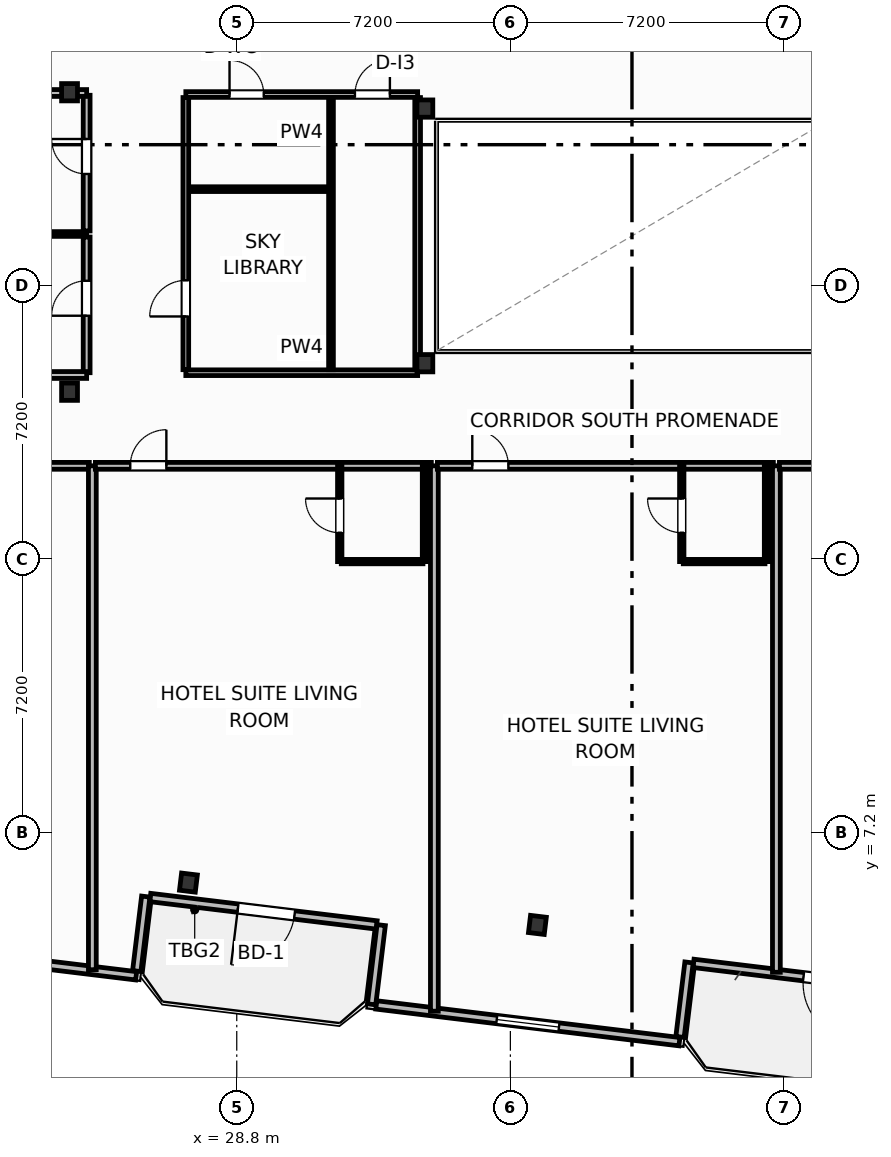
"""IFC4 building model, lengths in metres.
Left out: names, types, materials, properties, quantities, classifications, styles, units other than length and angle.
Written with IfcOpenShell. Run it as: python <this file> out.ifc"""

import sys

from ifc_helpers import new_model, si_unit, direction, frame, frame_2d, origin, origin_2d, place, context, subcontext, project, spatial, rectangle, i_section, extrude, element, fill, save


model = new_model("IFC4")
c1 = context("Model", 3, precision=1e-05, world=origin(), true_north=direction((0.0, 1.0)))
c2 = subcontext(c1, "Body", "Model", "MODEL_VIEW")
j1 = project(units=[si_unit("LENGTHUNIT", "METRE"), si_unit("PLANEANGLEUNIT", "RADIAN")], contexts=[c1])
p1 = place(None, origin())
s1 = spatial("IfcSite", under=j1, at=p1, CompositionType="ELEMENT")
p2 = place(p1, origin())
s2 = spatial("IfcBuilding", under=s1, at=p2, CompositionType="ELEMENT")
p3 = place(p2, frame((0.0, 0.0, 147.6)))
s3 = spatial("IfcBuildingStorey", under=s2, at=p3, CompositionType="ELEMENT", Elevation=147.6)
for number, where, z_axis, x_axis in (
    (1, (33.75, 19.55, 0.0), (0.0, 0.0, 1.0), (1.0, 0.0, 0.0)),
    (2, (33.75, 26.25, 0.0), (0.0, 0.0, 1.0), (1.0, 0.0, 0.0)),
    (3, (24.4, 18.8, 0.0), (0.0, 0.0, 1.0), (1.0, 0.0, 0.0)),
    (4, (24.4, 26.68, 0.0), (0.0, 0.0, 1.0), (1.0, 0.0, 0.0)),
    (5, (27.529, 5.884, 0.0), (0.0, 0.0, 1.0), (0.993, -0.12, 0.0)),
    (6, (36.711, 4.77, 0.0), (0.0, 0.0, 1.0), (0.993, -0.12, 0.0)),
):
    element("IfcColumn", number, at=place(p3, frame(where, z_axis=z_axis, x_axis=x_axis)), inside=s3, PredefinedType="COLUMN", context=c2, shape_type="SweptSolid", body=[
        extrude(i_section(OverallWidth=0.418, OverallDepth=0.455, WebThickness=0.042, FlangeThickness=0.068, FilletRadius=0.025, at=origin_2d()), origin(), (0.0, 0.0, 1.0), 3.7),
    ])
p4 = place(p3, frame((32.48, 4.77, 0.0), z_axis=(0.0, 0.0, 1.0), x_axis=(-0.992735402148, 0.120318000826, 0.0)))
e7 = element("IfcWall", 7, at=p4, inside=s3, PredefinedType="SOLIDWALL", context=c2, shape_type="SweptSolid", body=[
    extrude(rectangle(XDim=6.0, YDim=0.22, at=frame_2d((3.0, 0.0))), origin(), (0.0, 0.0, 1.0), 2.73),
])
p5 = place(p4, frame((2.176, 0.0, 0.0)))
e8 = element("IfcOpeningElement", 8, at=p5, cuts=e7, PredefinedType="OPENING", context=c2, shape_type="SweptSolid", body=[
    extrude(rectangle(XDim=1.5, YDim=2.25, at=frame_2d((0.75, 1.125))), frame((0.0, 0.12, 0.0), z_axis=(0.0, -1.0, 0.0), x_axis=(1.0, 0.0, 0.0)), (0.0, 0.0, 1.0), 0.24),
])
p6 = place(p3, frame((46.776, 3.037, 0.0), z_axis=(0.0, 0.0, 1.0), x_axis=(-0.992735402148, 0.120318000826, 0.0)))
e9 = element("IfcWall", 9, at=p6, inside=s3, PredefinedType="SOLIDWALL", context=c2, shape_type="SweptSolid", body=[
    extrude(rectangle(XDim=6.0, YDim=0.22, at=frame_2d((3.0, 0.0))), origin(), (0.0, 0.0, 1.0), 2.73),
])
p7 = place(p6, frame((1.584, 0.0, 0.0)))
e10 = element("IfcOpeningElement", 10, at=p7, cuts=e9, PredefinedType="OPENING", context=c2, shape_type="SweptSolid", body=[
    extrude(rectangle(XDim=1.5, YDim=2.25, at=frame_2d((0.75, 1.125))), frame((0.0, 0.12, 0.0), z_axis=(0.0, -1.0, 0.0), x_axis=(1.0, 0.0, 0.0)), (0.0, 0.0, 1.0), 0.24),
])
p8 = place(p3, frame((4.862, 6.012, 0.0), z_axis=(0.0, 0.0, 1.0), x_axis=(0.99273213367, -0.120344965739, 0.0)))
e11 = element("IfcWall", 11, at=p8, inside=s3, PredefinedType="SOLIDWALL", context=c2, shape_type="SweptSolid", body=[
    extrude(rectangle(XDim=21.447, YDim=0.22, at=frame_2d((10.724, 0.0))), origin(), (0.0, 0.0, 1.0), 2.73),
])
p9 = place(p8, frame((5.543, 0.0, 0.8)))
e12 = element("IfcOpeningElement", 12, at=p9, cuts=e11, PredefinedType="OPENING", context=c2, shape_type="SweptSolid", body=[
    extrude(rectangle(XDim=1.65, YDim=1.65, at=frame_2d((0.825, 0.825))), frame((0.0, 0.12, 0.0), z_axis=(0.0, -1.0, 0.0), x_axis=(1.0, 0.0, 0.0)), (0.0, 0.0, 1.0), 0.24),
])
p10 = place(p3, frame((26.168, 3.555, 0.0), z_axis=(0.0, 0.0, 1.0), x_axis=(0.120290754542, 0.992738703976, 0.0)))
e13 = element("IfcWall", 13, at=p10, inside=s3, PredefinedType="SOLIDWALL", context=c2, shape_type="SweptSolid", body=[
    extrude(rectangle(XDim=1.975, YDim=0.22, at=frame_2d((0.987, 0.0))), origin(), (0.0, 0.0, 1.0), 2.73),
])
p11 = place(p3, frame((32.601, 4.765, 0.0), z_axis=(0.0, 0.0, 1.0), x_axis=(-0.120327895535, -0.992734202874, 0.0)))
e14 = element("IfcWall", 14, at=p11, inside=s3, PredefinedType="SOLIDWALL", context=c2, shape_type="SweptSolid", body=[
    extrude(rectangle(XDim=2.1, YDim=0.22, at=frame_2d((1.05, 0.0))), origin(), (0.0, 0.0, 1.0), 2.73),
])
p12 = place(p3, frame((32.472, 2.665, 0.0), z_axis=(0.0, 0.0, 1.0), x_axis=(0.992734661931, -0.120324108143, 0.0)))
e15 = element("IfcWall", 15, at=p12, inside=s3, PredefinedType="SOLIDWALL", context=c2, shape_type="SweptSolid", body=[
    extrude(rectangle(XDim=8.035, YDim=0.22, at=frame_2d((4.018, 0.0))), origin(), (0.0, 0.0, 1.0), 2.73),
])
p13 = place(p12, frame((3.192, 0.0, 0.8)))
e16 = element("IfcOpeningElement", 16, at=p13, cuts=e15, PredefinedType="OPENING", context=c2, shape_type="SweptSolid", body=[
    extrude(rectangle(XDim=1.65, YDim=1.65, at=frame_2d((0.825, 0.825))), frame((0.0, 0.12, 0.0), z_axis=(0.0, -1.0, 0.0), x_axis=(1.0, 0.0, 0.0)), (0.0, 0.0, 1.0), 0.24),
])
p14 = place(p3, frame((40.464, 1.822, 0.0), z_axis=(0.0, 0.0, 1.0), x_axis=(0.120275992932, 0.992740492538, 0.0)))
e17 = element("IfcWall", 17, at=p14, inside=s3, PredefinedType="SOLIDWALL", context=c2, shape_type="SweptSolid", body=[
    extrude(rectangle(XDim=1.975, YDim=0.22, at=frame_2d((0.988, 0.0))), origin(), (0.0, 0.0, 1.0), 2.73),
])
p15 = place(p3, frame((16.08, 16.85, 0.0), z_axis=(0.0, 0.0, 1.0), x_axis=(1.0, 0.0, 0.0)))
e18 = element("IfcWall", 18, at=p15, inside=s3, PredefinedType="PARTITIONING", context=c2, shape_type="SweptSolid", body=[
    extrude(rectangle(XDim=8.84, YDim=0.18, at=frame_2d((4.42, 0.0))), origin(), (0.0, 0.0, 1.0), 3.45),
])
p16 = place(p15, frame((3.308, 0.0, 0.0)))
e19 = element("IfcOpeningElement", 19, at=p16, cuts=e18, PredefinedType="OPENING", context=c2, shape_type="SweptSolid", body=[
    extrude(rectangle(XDim=0.95, YDim=2.15, at=frame_2d((0.475, 1.075))), frame((0.0, 0.1, 0.0), z_axis=(0.0, -1.0, 0.0), x_axis=(1.0, 0.0, 0.0)), (0.0, 0.0, 1.0), 0.2),
])
p17 = place(p3, frame((25.0, 3.591, 0.0), z_axis=(0.0, 0.0, 1.0), x_axis=(0.0, 1.0, 0.0)))
e20 = element("IfcWall", 20, at=p17, inside=s3, PredefinedType="PARTITIONING", context=c2, shape_type="SweptSolid", body=[
    extrude(rectangle(XDim=13.259, YDim=0.205, at=frame_2d((6.629, 0.0))), origin(), (0.0, 0.0, 1.0), 2.662),
])
p18 = place(p3, frame((25.08, 16.85, 0.0), z_axis=(0.0, 0.0, 1.0), x_axis=(1.0, 0.0, 0.0)))
e21 = element("IfcWall", 21, at=p18, inside=s3, PredefinedType="PARTITIONING", context=c2, shape_type="SweptSolid", body=[
    extrude(rectangle(XDim=8.84, YDim=0.18, at=frame_2d((4.42, 0.0))), origin(), (0.0, 0.0, 1.0), 3.45),
])
p19 = place(p18, frame((0.918, 0.0, 0.0)))
e22 = element("IfcOpeningElement", 22, at=p19, cuts=e21, PredefinedType="OPENING", context=c2, shape_type="SweptSolid", body=[
    extrude(rectangle(XDim=0.95, YDim=2.15, at=frame_2d((0.475, 1.075))), frame((0.0, 0.1, 0.0), z_axis=(0.0, -1.0, 0.0), x_axis=(1.0, 0.0, 0.0)), (0.0, 0.0, 1.0), 0.2),
])
p20 = place(p3, frame((31.55, 14.33, 0.0), z_axis=(0.0, 0.0, 1.0), x_axis=(1.0, 0.0, 0.0)))
e23 = element("IfcWall", 23, at=p20, inside=s3, PredefinedType="PARTITIONING", context=c2, shape_type="SweptSolid", body=[
    extrude(rectangle(XDim=2.15, YDim=0.115, at=frame_2d((1.075, 0.0))), origin(), (0.0, 0.0, 1.0), 3.45),
])
p21 = place(p3, frame((31.51, 14.33, 0.0), z_axis=(0.0, 0.0, 1.0), x_axis=(0.0, 1.0, 0.0)))
e24 = element("IfcWall", 24, at=p21, inside=s3, PredefinedType="PARTITIONING", context=c2, shape_type="SweptSolid", body=[
    extrude(rectangle(XDim=2.52, YDim=0.115, at=frame_2d((1.26, 0.0))), origin(), (0.0, 0.0, 1.0), 3.45),
])
p22 = place(p21, frame((0.76, 0.0, 0.0)))
e25 = element("IfcOpeningElement", 25, at=p22, cuts=e24, PredefinedType="OPENING", context=c2, shape_type="SweptSolid", body=[
    extrude(rectangle(XDim=0.9, YDim=2.05, at=frame_2d((0.45, 1.025))), frame((0.0, 0.067, 0.0), z_axis=(0.0, -1.0, 0.0), x_axis=(1.0, 0.0, 0.0)), (0.0, 0.0, 1.0), 0.135),
])
p23 = place(p3, frame((33.74, 14.33, 0.0), z_axis=(0.0, 0.0, 1.0), x_axis=(0.0, 1.0, 0.0)))
e26 = element("IfcWall", 26, at=p23, inside=s3, PredefinedType="PARTITIONING", context=c2, shape_type="SweptSolid", body=[
    extrude(rectangle(XDim=2.52, YDim=0.115, at=frame_2d((1.26, 0.0))), origin(), (0.0, 0.0, 1.0), 3.45),
])
p24 = place(p3, frame((34.0, 2.5, 0.0), z_axis=(0.0, 0.0, 1.0), x_axis=(0.0, 1.0, 0.0)))
e27 = element("IfcWall", 27, at=p24, inside=s3, PredefinedType="PARTITIONING", context=c2, shape_type="SweptSolid", body=[
    extrude(rectangle(XDim=14.35, YDim=0.205, at=frame_2d((7.175, 0.0))), origin(), (0.0, 0.0, 1.0), 3.45),
])
p25 = place(p3, frame((34.08, 16.85, 0.0), z_axis=(0.0, 0.0, 1.0), x_axis=(1.0, 0.0, 0.0)))
e28 = element("IfcWall", 28, at=p25, inside=s3, PredefinedType="PARTITIONING", context=c2, shape_type="SweptSolid", body=[
    extrude(rectangle(XDim=8.84, YDim=0.18, at=frame_2d((4.42, 0.0))), origin(), (0.0, 0.0, 1.0), 3.45),
])
p26 = place(p25, frame((0.918, 0.0, 0.0)))
e29 = element("IfcOpeningElement", 29, at=p26, cuts=e28, PredefinedType="OPENING", context=c2, shape_type="SweptSolid", body=[
    extrude(rectangle(XDim=0.95, YDim=2.15, at=frame_2d((0.475, 1.075))), frame((0.0, 0.1, 0.0), z_axis=(0.0, -1.0, 0.0), x_axis=(1.0, 0.0, 0.0)), (0.0, 0.0, 1.0), 0.2),
])
p27 = place(p3, frame((40.55, 14.33, 0.0), z_axis=(0.0, 0.0, 1.0), x_axis=(1.0, 0.0, 0.0)))
e30 = element("IfcWall", 30, at=p27, inside=s3, PredefinedType="PARTITIONING", context=c2, shape_type="SweptSolid", body=[
    extrude(rectangle(XDim=2.15, YDim=0.115, at=frame_2d((1.075, 0.0))), origin(), (0.0, 0.0, 1.0), 3.45),
])
p28 = place(p3, frame((40.51, 14.33, 0.0), z_axis=(0.0, 0.0, 1.0), x_axis=(0.0, 1.0, 0.0)))
e31 = element("IfcWall", 31, at=p28, inside=s3, PredefinedType="PARTITIONING", context=c2, shape_type="SweptSolid", body=[
    extrude(rectangle(XDim=2.52, YDim=0.115, at=frame_2d((1.26, 0.0))), origin(), (0.0, 0.0, 1.0), 3.45),
])
p29 = place(p28, frame((0.76, 0.0, 0.0)))
e32 = element("IfcOpeningElement", 32, at=p29, cuts=e31, PredefinedType="OPENING", context=c2, shape_type="SweptSolid", body=[
    extrude(rectangle(XDim=0.9, YDim=2.05, at=frame_2d((0.45, 1.025))), frame((0.0, 0.067, 0.0), z_axis=(0.0, -1.0, 0.0), x_axis=(1.0, 0.0, 0.0)), (0.0, 0.0, 1.0), 0.135),
])
p30 = place(p3, frame((42.74, 14.33, 0.0), z_axis=(0.0, 0.0, 1.0), x_axis=(0.0, 1.0, 0.0)))
e33 = element("IfcWall", 33, at=p30, inside=s3, PredefinedType="PARTITIONING", context=c2, shape_type="SweptSolid", body=[
    extrude(rectangle(XDim=2.52, YDim=0.115, at=frame_2d((1.26, 0.0))), origin(), (0.0, 0.0, 1.0), 3.45),
])
p31 = place(p3, frame((43.0, 3.524, 0.0), z_axis=(0.0, 0.0, 1.0), x_axis=(0.0, 1.0, 0.0)))
e34 = element("IfcWall", 34, at=p31, inside=s3, PredefinedType="PARTITIONING", context=c2, shape_type="SweptSolid", body=[
    extrude(rectangle(XDim=13.326, YDim=0.205, at=frame_2d((6.663, 0.0))), origin(), (0.0, 0.0, 1.0), 3.45),
])
p32 = place(p3, frame((43.08, 16.85, 0.0), z_axis=(0.0, 0.0, 1.0), x_axis=(1.0, 0.0, 0.0)))
e35 = element("IfcWall", 35, at=p32, inside=s3, PredefinedType="PARTITIONING", context=c2, shape_type="SweptSolid", body=[
    extrude(rectangle(XDim=8.84, YDim=0.18, at=frame_2d((4.42, 0.0))), origin(), (0.0, 0.0, 1.0), 3.45),
])
p33 = place(p32, frame((0.918, 0.0, 0.0)))
e36 = element("IfcOpeningElement", 36, at=p33, cuts=e35, PredefinedType="OPENING", context=c2, shape_type="SweptSolid", body=[
    extrude(rectangle(XDim=0.95, YDim=2.15, at=frame_2d((0.475, 1.075))), frame((0.0, 0.1, 0.0), z_axis=(0.0, -1.0, 0.0), x_axis=(1.0, 0.0, 0.0)), (0.0, 0.0, 1.0), 0.2),
])
p34 = place(p3, frame((24.85, 19.3, 0.0), z_axis=(0.0, 0.0, 1.0), x_axis=(0.0, 1.0, 0.0)))
e37 = element("IfcWall", 37, at=p34, inside=s3, PredefinedType="PARTITIONING", context=c2, shape_type="SweptSolid", body=[
    extrude(rectangle(XDim=3.57, YDim=0.18, at=frame_2d((1.785, 0.0))), origin(), (0.0, 0.0, 1.0), 3.45),
])
p35 = place(p34, frame((1.5, 0.0, 0.0)))
e38 = element("IfcOpeningElement", 38, at=p35, cuts=e37, PredefinedType="OPENING", context=c2, shape_type="SweptSolid", body=[
    extrude(rectangle(XDim=0.92, YDim=2.05, at=frame_2d((0.46, 1.025))), frame((0.0, 0.1, 0.0), z_axis=(0.0, -1.0, 0.0), x_axis=(1.0, 0.0, 0.0)), (0.0, 0.0, 1.0), 0.2),
])
p36 = place(p3, frame((24.85, 23.03, 0.0), z_axis=(0.0, 0.0, 1.0), x_axis=(0.0, 1.0, 0.0)))
e39 = element("IfcWall", 39, at=p36, inside=s3, PredefinedType="PARTITIONING", context=c2, shape_type="SweptSolid", body=[
    extrude(rectangle(XDim=3.57, YDim=0.18, at=frame_2d((1.785, 0.0))), origin(), (0.0, 0.0, 1.0), 3.45),
])
p37 = place(p36, frame((1.5, 0.0, 0.0)))
e40 = element("IfcOpeningElement", 40, at=p37, cuts=e39, PredefinedType="OPENING", context=c2, shape_type="SweptSolid", body=[
    extrude(rectangle(XDim=0.92, YDim=2.05, at=frame_2d((0.46, 1.025))), frame((0.0, 0.1, 0.0), z_axis=(0.0, -1.0, 0.0), x_axis=(1.0, 0.0, 0.0)), (0.0, 0.0, 1.0), 0.2),
])
p38 = place(p3, frame((1.624, 22.95, 0.0), z_axis=(0.0, 0.0, 1.0), x_axis=(1.0, 0.0, 0.0)))
e41 = element("IfcWall", 41, at=p38, inside=s3, PredefinedType="PARTITIONING", context=c2, shape_type="SweptSolid", body=[
    extrude(rectangle(XDim=23.226, YDim=0.125, at=frame_2d((11.613, 0.0))), origin(), (0.0, 0.0, 1.0), 3.45),
])
p39 = place(p3, frame((1.174, 19.24, 0.0), z_axis=(0.0, 0.0, 1.0), x_axis=(1.0, 0.0, 0.0)))
e42 = element("IfcWall", 42, at=p39, inside=s3, PredefinedType="PARTITIONING", context=c2, shape_type="SweptSolid", body=[
    extrude(rectangle(XDim=23.676, YDim=0.18, at=frame_2d((11.838, 0.0))), origin(), (0.0, 0.0, 1.0), 3.45),
])
p40 = place(p3, frame((2.073, 26.66, 0.0), z_axis=(0.0, 0.0, 1.0), x_axis=(1.0, 0.0, 0.0)))
e43 = element("IfcWall", 43, at=p40, inside=s3, PredefinedType="PARTITIONING", context=c2, shape_type="SweptSolid", body=[
    extrude(rectangle(XDim=22.777, YDim=0.18, at=frame_2d((11.388, 0.0))), origin(), (0.0, 0.0, 1.0), 2.662),
])
p41 = place(p3, frame((27.46, 19.3, 0.0), z_axis=(0.0, 0.0, 1.0), x_axis=(1.0, 0.0, 0.0)))
e44 = element("IfcWall", 44, at=p41, inside=s3, PredefinedType="PARTITIONING", context=c2, shape_type="SweptSolid", body=[
    extrude(rectangle(XDim=6.1, YDim=0.15, at=frame_2d((3.05, 0.0))), origin(), (0.0, 0.0, 1.0), 2.662),
])
p42 = place(p3, frame((27.46, 26.62, 0.0), z_axis=(0.0, 0.0, 1.0), x_axis=(1.0, 0.0, 0.0)))
e45 = element("IfcWall", 45, at=p42, inside=s3, PredefinedType="PARTITIONING", context=c2, shape_type="SweptSolid", body=[
    extrude(rectangle(XDim=6.1, YDim=0.15, at=frame_2d((3.05, 0.0))), origin(), (0.0, 0.0, 1.0), 2.662),
])
p43 = place(p42, frame((1.15, 0.0, 0.0)))
e46 = element("IfcOpeningElement", 46, at=p43, cuts=e45, PredefinedType="OPENING", context=c2, shape_type="SweptSolid", body=[
    extrude(rectangle(XDim=0.9, YDim=2.05, at=frame_2d((0.45, 1.025))), frame((0.0, 0.085, 0.0), z_axis=(0.0, -1.0, 0.0), x_axis=(1.0, 0.0, 0.0)), (0.0, 0.0, 1.0), 0.17),
])
p44 = place(p42, frame((4.45, 0.0, 0.0)))
e47 = element("IfcOpeningElement", 47, at=p44, cuts=e45, PredefinedType="OPENING", context=c2, shape_type="SweptSolid", body=[
    extrude(rectangle(XDim=0.92, YDim=2.05, at=frame_2d((0.46, 1.025))), frame((0.0, 0.085, 0.0), z_axis=(0.0, -1.0, 0.0), x_axis=(1.0, 0.0, 0.0)), (0.0, 0.0, 1.0), 0.17),
])
p45 = place(p3, frame((31.28, 19.38, 0.0), z_axis=(0.0, 0.0, 1.0), x_axis=(0.0, 1.0, 0.0)))
e48 = element("IfcWall", 48, at=p45, inside=s3, PredefinedType="PARTITIONING", context=c2, shape_type="SweptSolid", body=[
    extrude(rectangle(XDim=7.16, YDim=0.125, at=frame_2d((3.58, 0.0))), origin(), (0.0, 0.0, 1.0), 3.45),
])
p46 = place(p3, frame((27.52, 24.13, 0.0), z_axis=(0.0, 0.0, 1.0), x_axis=(1.0, 0.0, 0.0)))
e49 = element("IfcWall", 49, at=p46, inside=s3, PredefinedType="PARTITIONING", context=c2, shape_type="SweptSolid", body=[
    extrude(rectangle(XDim=3.7, YDim=0.125, at=frame_2d((1.85, 0.0))), origin(), (0.0, 0.0, 1.0), 3.45),
])
p47 = place(p3, frame((27.46, 19.38, 0.0), z_axis=(0.0, 0.0, 1.0), x_axis=(0.0, 1.0, 0.0)))
e50 = element("IfcWall", 50, at=p47, inside=s3, PredefinedType="PARTITIONING", context=c2, shape_type="SweptSolid", body=[
    extrude(rectangle(XDim=7.16, YDim=0.15, at=frame_2d((3.58, 0.0))), origin(), (0.0, 0.0, 1.0), 3.45),
])
p48 = place(p47, frame((1.4, 0.0, 0.0)))
e51 = element("IfcOpeningElement", 51, at=p48, cuts=e50, PredefinedType="OPENING", context=c2, shape_type="SweptSolid", body=[
    extrude(rectangle(XDim=0.95, YDim=2.05, at=frame_2d((0.475, 1.025))), frame((0.0, 0.085, 0.0), z_axis=(0.0, -1.0, 0.0), x_axis=(1.0, 0.0, 0.0)), (0.0, 0.0, 1.0), 0.17),
])
p49 = place(p3, frame((33.56, 19.38, 0.0), z_axis=(0.0, 0.0, 1.0), x_axis=(0.0, 1.0, 0.0)))
e52 = element("IfcWall", 52, at=p49, inside=s3, PredefinedType="PARTITIONING", context=c2, shape_type="SweptSolid", body=[
    extrude(rectangle(XDim=7.16, YDim=0.15, at=frame_2d((3.58, 0.0))), origin(), (0.0, 0.0, 1.0), 2.824),
])
p50 = place(p5, origin())
e53 = element("IfcDoor", 53, at=p50, inside=s3, OperationType="SINGLE_SWING_RIGHT", PredefinedType="DOOR", context=c2, shape_type="SweptSolid", body=[
    extrude(rectangle(XDim=1.5, YDim=2.25, at=frame_2d((0.75, 1.125))), frame((0.0, 0.025, 0.0), z_axis=(0.0, -1.0, 0.0), x_axis=(1.0, 0.0, 0.0)), (0.0, 0.0, 1.0), 0.05),
])
fill(e8, e53)
p51 = place(p7, origin())
e54 = element("IfcDoor", 54, at=p51, inside=s3, OperationType="SINGLE_SWING_LEFT", PredefinedType="DOOR", context=c2, shape_type="SweptSolid", body=[
    extrude(rectangle(XDim=1.5, YDim=2.25, at=frame_2d((0.75, 1.125))), frame((0.0, 0.025, 0.0), z_axis=(0.0, -1.0, 0.0), x_axis=(1.0, 0.0, 0.0)), (0.0, 0.0, 1.0), 0.05),
])
fill(e10, e54)
p52 = place(p13, origin())
e55 = element("IfcWindow", 55, at=p52, inside=s3, PartitioningType="SINGLE_PANEL", PredefinedType="WINDOW", context=c2, shape_type="SweptSolid", body=[
    extrude(rectangle(XDim=1.65, YDim=1.65, at=frame_2d((0.825, 0.825))), frame((0.0, 0.03, 0.0), z_axis=(0.0, -1.0, 0.0), x_axis=(1.0, 0.0, 0.0)), (0.0, 0.0, 1.0), 0.06),
])
fill(e16, e55)
p53 = place(p19, origin())
e56 = element("IfcDoor", 56, at=p53, inside=s3, OperationType="SINGLE_SWING_RIGHT", PredefinedType="DOOR", context=c2, shape_type="SweptSolid", body=[
    extrude(rectangle(XDim=0.95, YDim=2.15, at=frame_2d((0.475, 1.075))), frame((0.0, 0.025, 0.0), z_axis=(0.0, -1.0, 0.0), x_axis=(1.0, 0.0, 0.0)), (0.0, 0.0, 1.0), 0.05),
])
fill(e22, e56)
p54 = place(p22, origin())
e57 = element("IfcDoor", 57, at=p54, inside=s3, OperationType="SINGLE_SWING_RIGHT", PredefinedType="DOOR", context=c2, shape_type="SweptSolid", body=[
    extrude(rectangle(XDim=0.9, YDim=2.05, at=frame_2d((0.45, 1.025))), frame((0.0, 0.025, 0.0), z_axis=(0.0, -1.0, 0.0), x_axis=(1.0, 0.0, 0.0)), (0.0, 0.0, 1.0), 0.05),
])
fill(e25, e57)
p55 = place(p26, origin())
e58 = element("IfcDoor", 58, at=p55, inside=s3, OperationType="SINGLE_SWING_LEFT", PredefinedType="DOOR", context=c2, shape_type="SweptSolid", body=[
    extrude(rectangle(XDim=0.95, YDim=2.15, at=frame_2d((0.475, 1.075))), frame((0.0, 0.025, 0.0), z_axis=(0.0, -1.0, 0.0), x_axis=(1.0, 0.0, 0.0)), (0.0, 0.0, 1.0), 0.05),
])
fill(e29, e58)
p56 = place(p29, origin())
e59 = element("IfcDoor", 59, at=p56, inside=s3, OperationType="SINGLE_SWING_RIGHT", PredefinedType="DOOR", context=c2, shape_type="SweptSolid", body=[
    extrude(rectangle(XDim=0.9, YDim=2.05, at=frame_2d((0.45, 1.025))), frame((0.0, 0.025, 0.0), z_axis=(0.0, -1.0, 0.0), x_axis=(1.0, 0.0, 0.0)), (0.0, 0.0, 1.0), 0.05),
])
fill(e32, e59)
p57 = place(p35, origin())
e60 = element("IfcDoor", 60, at=p57, inside=s3, OperationType="SINGLE_SWING_LEFT", PredefinedType="DOOR", context=c2, shape_type="SweptSolid", body=[
    extrude(rectangle(XDim=0.92, YDim=2.05, at=frame_2d((0.46, 1.025))), frame((0.0, 0.025, 0.0), z_axis=(0.0, -1.0, 0.0), x_axis=(1.0, 0.0, 0.0)), (0.0, 0.0, 1.0), 0.05),
])
fill(e38, e60)
p58 = place(p37, origin())
e61 = element("IfcDoor", 61, at=p58, inside=s3, OperationType="SINGLE_SWING_RIGHT", PredefinedType="DOOR", context=c2, shape_type="SweptSolid", body=[
    extrude(rectangle(XDim=0.92, YDim=2.05, at=frame_2d((0.46, 1.025))), frame((0.0, 0.025, 0.0), z_axis=(0.0, -1.0, 0.0), x_axis=(1.0, 0.0, 0.0)), (0.0, 0.0, 1.0), 0.05),
])
fill(e40, e61)
p59 = place(p43, origin())
e62 = element("IfcDoor", 62, at=p59, inside=s3, OperationType="SINGLE_SWING_LEFT", PredefinedType="DOOR", context=c2, shape_type="SweptSolid", body=[
    extrude(rectangle(XDim=0.9, YDim=2.05, at=frame_2d((0.45, 1.025))), frame((0.0, 0.025, 0.0), z_axis=(0.0, -1.0, 0.0), x_axis=(1.0, 0.0, 0.0)), (0.0, 0.0, 1.0), 0.05),
])
fill(e46, e62)
p60 = place(p44, origin())
e63 = element("IfcDoor", 63, at=p60, inside=s3, OperationType="SINGLE_SWING_RIGHT", PredefinedType="DOOR", context=c2, shape_type="SweptSolid", body=[
    extrude(rectangle(XDim=0.92, YDim=2.05, at=frame_2d((0.46, 1.025))), frame((0.0, 0.025, 0.0), z_axis=(0.0, -1.0, 0.0), x_axis=(1.0, 0.0, 0.0)), (0.0, 0.0, 1.0), 0.05),
])
fill(e47, e63)
p61 = place(p48, origin())
e64 = element("IfcDoor", 64, at=p61, inside=s3, OperationType="SINGLE_SWING_LEFT", PredefinedType="DOOR", context=c2, shape_type="SweptSolid", body=[
    extrude(rectangle(XDim=0.95, YDim=2.05, at=frame_2d((0.475, 1.025))), frame((0.0, 0.025, 0.0), z_axis=(0.0, -1.0, 0.0), x_axis=(1.0, 0.0, 0.0)), (0.0, 0.0, 1.0), 0.05),
])
fill(e51, e64)
save(model, sys.argv[1])
